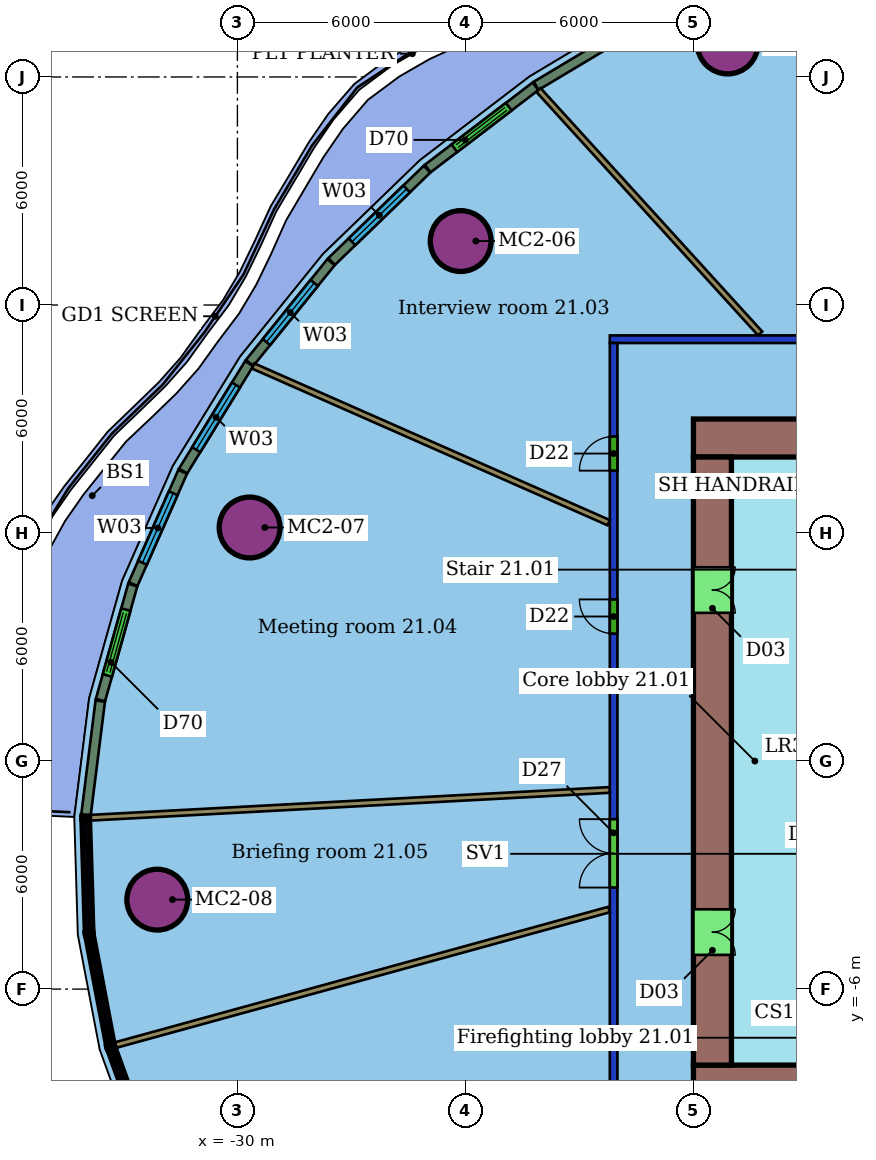
"""IFC4 building model, lengths in metres.
Left out: names, types, materials, properties, quantities, classifications, styles, units other than length and angle.
Written with IfcOpenShell. Run it as: python <this file> out.ifc"""

import sys

from ifc_helpers import new_model, si_unit, direction, frame, frame_2d, origin, origin_2d, place, context, subcontext, project, spatial, rectangle, hollow_circle, extrude, element, fill, save


model = new_model("IFC4")
c1 = context("Model", 3, precision=1e-05, world=origin(), true_north=direction((0.0, 1.0)))
c2 = subcontext(c1, "Body", "Model", "MODEL_VIEW")
j1 = project(units=[si_unit("LENGTHUNIT", "METRE"), si_unit("PLANEANGLEUNIT", "RADIAN")], contexts=[c1])
p1 = place(None, origin())
s1 = spatial("IfcSite", under=j1, at=p1, CompositionType="ELEMENT")
p2 = place(p1, origin())
s2 = spatial("IfcBuilding", under=s1, at=p2, CompositionType="ELEMENT")
p3 = place(p2, frame((0.0, 0.0, 95.8)))
s3 = spatial("IfcBuildingStorey", under=s2, at=p3, CompositionType="ELEMENT", Elevation=95.8)
for number, where, z_axis, x_axis in (
    (1, (-17.1, 18.881, 0.0), (0.0, 0.0, 1.0), (1.0, 0.0, 0.0)),
    (2, (-24.125, 13.683, 0.0), (0.0, 0.0, 1.0), (1.0, 0.0, 0.0)),
    (3, (-29.679, 6.146, 0.0), (0.0, 0.0, 1.0), (1.0, 0.0, 0.0)),
    (4, (-32.109, -3.646, 0.0), (0.0, 0.0, 1.0), (1.0, 0.0, 0.0)),
):
    element("IfcColumn", number, at=place(p3, frame(where, z_axis=z_axis, x_axis=x_axis)), inside=s3, PredefinedType="COLUMN", context=c2, shape_type="SweptSolid", body=[
        extrude(hollow_circle(Radius=0.8, WallThickness=0.055, at=origin_2d()), origin(), (0.0, 0.0, 1.0), 3.45),
    ])
p4 = place(p3, frame((-20.1, -11.0, 0.0), z_axis=(0.0, 0.0, 1.0), x_axis=(0.0, 1.0, 0.0)))
e5 = element("IfcWall", 5, at=p4, inside=s3, PredefinedType="PARTITIONING", context=c2, shape_type="SweptSolid", body=[
    extrude(rectangle(XDim=22.0, YDim=0.2, at=frame_2d((11.0, 0.0))), origin(), (0.0, 0.0, 1.0), 3.0),
])
p5 = place(p4, frame((18.641, 0.0, 0.0)))
e6 = element("IfcOpeningElement", 6, at=p5, cuts=e5, PredefinedType="OPENING", context=c2, shape_type="SweptSolid", body=[
    extrude(rectangle(XDim=0.9, YDim=2.1, at=frame_2d((0.45, 1.05))), frame((0.0, 0.11, 0.0), z_axis=(0.0, -1.0, 0.0), x_axis=(1.0, 0.0, 0.0)), (0.0, 0.0, 1.0), 0.22),
])
p6 = place(p4, frame((14.354, 0.0, 0.0)))
e7 = element("IfcOpeningElement", 7, at=p6, cuts=e5, PredefinedType="OPENING", context=c2, shape_type="SweptSolid", body=[
    extrude(rectangle(XDim=0.9, YDim=2.1, at=frame_2d((0.45, 1.05))), frame((0.0, 0.11, 0.0), z_axis=(0.0, -1.0, 0.0), x_axis=(1.0, 0.0, 0.0)), (0.0, 0.0, 1.0), 0.22),
])
p7 = place(p4, frame((7.672, 0.0, 0.0)))
e8 = element("IfcOpeningElement", 8, at=p7, cuts=e5, PredefinedType="OPENING", context=c2, shape_type="SweptSolid", body=[
    extrude(rectangle(XDim=1.8, YDim=2.4, at=frame_2d((0.9, 1.2))), frame((0.0, 0.11, 0.0), z_axis=(0.0, -1.0, 0.0), x_axis=(1.0, 0.0, 0.0)), (0.0, 0.0, 1.0), 0.22),
])
p8 = place(p3, frame((-20.2, 11.1, 0.0), z_axis=(0.0, 0.0, 1.0), x_axis=(1.0, 0.0, 0.0)))
e9 = element("IfcWall", 9, at=p8, inside=s3, PredefinedType="PARTITIONING", context=c2, shape_type="SweptSolid", body=[
    extrude(rectangle(XDim=28.4, YDim=0.2, at=frame_2d((14.2, 0.0))), origin(), (0.0, 0.0, 1.0), 3.0),
])
p9 = place(p8, frame((20.93, 0.0, 0.0)))
e10 = element("IfcOpeningElement", 10, at=p9, cuts=e9, PredefinedType="OPENING", context=c2, shape_type="SweptSolid", body=[
    extrude(rectangle(XDim=1.8, YDim=2.1, at=frame_2d((0.9, 1.05))), frame((0.0, 0.11, 0.0), z_axis=(0.0, -1.0, 0.0), x_axis=(1.0, 0.0, 0.0)), (0.0, 0.0, 1.0), 0.22),
])
p10 = place(p8, frame((12.561, 0.0, 0.0)))
e11 = element("IfcOpeningElement", 11, at=p10, cuts=e9, PredefinedType="OPENING", context=c2, shape_type="SweptSolid", body=[
    extrude(rectangle(XDim=1.8, YDim=2.1, at=frame_2d((0.9, 1.05))), frame((0.0, 0.11, 0.0), z_axis=(0.0, -1.0, 0.0), x_axis=(1.0, 0.0, 0.0)), (0.0, 0.0, 1.0), 0.22),
])
p11 = place(p3, frame((-22.078, 17.658, 0.0), z_axis=(0.0, 0.0, 1.0), x_axis=(0.673255961177, -0.739409501386, 0.0)))
e12 = element("IfcWall", 12, at=p11, inside=s3, PredefinedType="PARTITIONING", context=c2, shape_type="SweptSolid", body=[
    extrude(rectangle(XDim=8.665, YDim=0.15, at=frame_2d((4.333, 0.0))), origin(), (0.0, 0.0, 1.0), 3.45),
])
p12 = place(p3, frame((-29.583, 10.395, 0.0), z_axis=(0.0, 0.0, 1.0), x_axis=(0.915049283518, -0.403342049301, 0.0)))
e13 = element("IfcWall", 13, at=p12, inside=s3, PredefinedType="PARTITIONING", context=c2, shape_type="SweptSolid", body=[
    extrude(rectangle(XDim=10.222, YDim=0.15, at=frame_2d((5.111, 0.0))), origin(), (0.0, 0.0, 1.0), 3.45),
])
p13 = place(p3, frame((-33.868, -1.491, 0.0), z_axis=(0.0, 0.0, 1.0), x_axis=(0.998571262097, 0.053436265902, 0.0)))
e14 = element("IfcWall", 14, at=p13, inside=s3, PredefinedType="PARTITIONING", context=c2, shape_type="SweptSolid", body=[
    extrude(rectangle(XDim=13.684, YDim=0.15, at=frame_2d((6.842, 0.0))), origin(), (0.0, 0.0, 1.0), 3.45),
])
p14 = place(p3, frame((-33.215, -7.476, 0.0), z_axis=(0.0, 0.0, 1.0), x_axis=(0.9642755307, 0.26490130406, 0.0)))
e15 = element("IfcWall", 15, at=p14, inside=s3, PredefinedType="PARTITIONING", context=c2, shape_type="SweptSolid", body=[
    extrude(rectangle(XDim=13.476, YDim=0.15, at=frame_2d((6.738, 0.0))), origin(), (0.0, 0.0, 1.0), 3.45),
])
p15 = place(p3, frame((-19.063, 19.608, 0.0), z_axis=(0.0, 0.0, 1.0), x_axis=(-0.858051412051, -0.51356379767, 0.0)))
e16 = element("IfcWall", 16, at=p15, inside=s3, PredefinedType="SOLIDWALL", context=c2, shape_type="SweptSolid", body=[
    extrude(rectangle(XDim=3.584, YDim=0.25, at=frame_2d((1.792, 0.0))), origin(), (0.0, 0.0, 1.0), 3.05),
])
p16 = place(p3, frame((-22.157, 17.755, 0.0), z_axis=(0.0, 0.0, 1.0), x_axis=(-0.794806214146, -0.606863314063, 0.0)))
e17 = element("IfcWall", 17, at=p16, inside=s3, PredefinedType="SOLIDWALL", context=c2, shape_type="SweptSolid", body=[
    extrude(rectangle(XDim=3.568, YDim=0.25, at=frame_2d((1.784, 0.0))), origin(), (0.0, 0.0, 1.0), 3.05),
])
p17 = place(p16, frame((0.884, 0.0, 0.0)))
e18 = element("IfcOpeningElement", 18, at=p17, cuts=e17, PredefinedType="OPENING", context=c2, shape_type="SweptSolid", body=[
    extrude(rectangle(XDim=1.8, YDim=2.4, at=frame_2d((0.9, 1.2))), frame((0.0, 0.135, 0.0), z_axis=(0.0, -1.0, 0.0), x_axis=(1.0, 0.0, 0.0)), (0.0, 0.0, 1.0), 0.27),
])
p18 = place(p3, frame((-25.01, 15.574, 0.0), z_axis=(0.0, 0.0, 1.0), x_axis=(-0.718578482656, -0.695445874432, 0.0)))
e19 = element("IfcWall", 19, at=p18, inside=s3, PredefinedType="SOLIDWALL", context=c2, shape_type="SweptSolid", body=[
    extrude(rectangle(XDim=3.493, YDim=0.25, at=frame_2d((1.747, 0.0))), origin(), (0.0, 0.0, 1.0), 3.05),
])
p19 = place(p18, frame((0.747, 0.0, 0.9)))
e20 = element("IfcOpeningElement", 20, at=p19, cuts=e19, PredefinedType="OPENING", context=c2, shape_type="SweptSolid", body=[
    extrude(rectangle(XDim=2.0, YDim=2.1, at=frame_2d((1.0, 1.05))), frame((0.0, 0.135, 0.0), z_axis=(0.0, -1.0, 0.0), x_axis=(1.0, 0.0, 0.0)), (0.0, 0.0, 1.0), 0.27),
])
p20 = place(p3, frame((-27.536, 13.128, 0.0), z_axis=(0.0, 0.0, 1.0), x_axis=(-0.62851383429, -0.777798405826, 0.0)))
e21 = element("IfcWall", 21, at=p20, inside=s3, PredefinedType="SOLIDWALL", context=c2, shape_type="SweptSolid", body=[
    extrude(rectangle(XDim=3.408, YDim=0.25, at=frame_2d((1.704, 0.0))), origin(), (0.0, 0.0, 1.0), 3.05),
])
p21 = place(p20, frame((0.704, 0.0, 0.9)))
e22 = element("IfcOpeningElement", 22, at=p21, cuts=e21, PredefinedType="OPENING", context=c2, shape_type="SweptSolid", body=[
    extrude(rectangle(XDim=2.0, YDim=2.1, at=frame_2d((1.0, 1.05))), frame((0.0, 0.135, 0.0), z_axis=(0.0, -1.0, 0.0), x_axis=(1.0, 0.0, 0.0)), (0.0, 0.0, 1.0), 0.27),
])
p22 = place(p3, frame((-29.692, 10.457, 0.0), z_axis=(0.0, 0.0, 1.0), x_axis=(-0.523740167925, -0.851878064339, 0.0)))
e23 = element("IfcWall", 23, at=p22, inside=s3, PredefinedType="SOLIDWALL", context=c2, shape_type="SweptSolid", body=[
    extrude(rectangle(XDim=3.318, YDim=0.25, at=frame_2d((1.659, 0.0))), origin(), (0.0, 0.0, 1.0), 3.05),
])
p23 = place(p22, frame((0.659, 0.0, 0.9)))
e24 = element("IfcOpeningElement", 24, at=p23, cuts=e23, PredefinedType="OPENING", context=c2, shape_type="SweptSolid", body=[
    extrude(rectangle(XDim=2.0, YDim=2.1, at=frame_2d((1.0, 1.05))), frame((0.0, 0.135, 0.0), z_axis=(0.0, -1.0, 0.0), x_axis=(1.0, 0.0, 0.0)), (0.0, 0.0, 1.0), 0.27),
])
p24 = place(p3, frame((-31.441, 7.609, 0.0), z_axis=(0.0, 0.0, 1.0), x_axis=(-0.404074069782, -0.914726268416, 0.0)))
e25 = element("IfcWall", 25, at=p24, inside=s3, PredefinedType="SOLIDWALL", context=c2, shape_type="SweptSolid", body=[
    extrude(rectangle(XDim=3.228, YDim=0.25, at=frame_2d((1.614, 0.0))), origin(), (0.0, 0.0, 1.0), 3.05),
])
p25 = place(p24, frame((0.614, 0.0, 0.9)))
e26 = element("IfcOpeningElement", 26, at=p25, cuts=e25, PredefinedType="OPENING", context=c2, shape_type="SweptSolid", body=[
    extrude(rectangle(XDim=2.0, YDim=2.1, at=frame_2d((1.0, 1.05))), frame((0.0, 0.135, 0.0), z_axis=(0.0, -1.0, 0.0), x_axis=(1.0, 0.0, 0.0)), (0.0, 0.0, 1.0), 0.27),
])
p26 = place(p3, frame((-32.754, 4.633, 0.0), z_axis=(0.0, 0.0, 1.0), x_axis=(-0.27027785562, -0.962782364173, 0.0)))
e27 = element("IfcWall", 27, at=p26, inside=s3, PredefinedType="SOLIDWALL", context=c2, shape_type="SweptSolid", body=[
    extrude(rectangle(XDim=3.144, YDim=0.25, at=frame_2d((1.572, 0.0))), origin(), (0.0, 0.0, 1.0), 3.05),
])
p27 = place(p26, frame((0.672, 0.0, 0.0)))
e28 = element("IfcOpeningElement", 28, at=p27, cuts=e27, PredefinedType="OPENING", context=c2, shape_type="SweptSolid", body=[
    extrude(rectangle(XDim=1.8, YDim=2.4, at=frame_2d((0.9, 1.2))), frame((0.0, 0.135, 0.0), z_axis=(0.0, -1.0, 0.0), x_axis=(1.0, 0.0, 0.0)), (0.0, 0.0, 1.0), 0.27),
])
p28 = place(p3, frame((-33.609, 1.579, 0.0), z_axis=(0.0, 0.0, 1.0), x_axis=(-0.124351721446, -0.992238201932, 0.0)))
e29 = element("IfcWall", 29, at=p28, inside=s3, PredefinedType="SOLIDWALL", context=c2, shape_type="SweptSolid", body=[
    extrude(rectangle(XDim=3.033, YDim=0.25, at=frame_2d((1.517, 0.0))), origin(), (0.0, 0.0, 1.0), 3.05),
])
p29 = place(p3, frame((-6.0, 8.5, 0.0), z_axis=(0.0, 0.0, 1.0), x_axis=(-1.0, 0.0, 0.0)))
e30 = element("IfcWall", 30, at=p29, inside=s3, PredefinedType="SHEAR", context=c2, shape_type="SweptSolid", body=[
    extrude(rectangle(XDim=12.0, YDim=1.0, at=frame_2d((6.0, 0.0))), origin(), (0.0, 0.0, 1.0), 3.3),
])
p30 = place(p29, frame((5.2, 0.0, 0.0)))
e31 = element("IfcOpeningElement", 31, at=p30, cuts=e30, PredefinedType="OPENING", context=c2, shape_type="SweptSolid", body=[
    extrude(rectangle(XDim=1.2, YDim=2.1, at=frame_2d((0.6, 1.05))), frame((0.0, 0.51, 0.0), z_axis=(0.0, -1.0, 0.0), x_axis=(1.0, 0.0, 0.0)), (0.0, 0.0, 1.0), 1.02),
])
p31 = place(p3, frame((-18.0, -8.5, 0.0), z_axis=(0.0, 0.0, 1.0), x_axis=(1.0, 0.0, 0.0)))
e32 = element("IfcWall", 32, at=p31, inside=s3, PredefinedType="SHEAR", context=c2, shape_type="SweptSolid", body=[
    extrude(rectangle(XDim=24.0, YDim=1.0, at=frame_2d((12.0, 0.0))), origin(), (0.0, 0.0, 1.0), 3.3),
])
p32 = place(p31, frame((6.0, 0.0, 0.0)))
e33 = element("IfcOpeningElement", 33, at=p32, cuts=e32, PredefinedType="OPENING", context=c2, shape_type="SweptSolid", body=[
    extrude(rectangle(XDim=1.2, YDim=2.1, at=frame_2d((0.6, 1.05))), frame((0.0, 0.51, 0.0), z_axis=(0.0, -1.0, 0.0), x_axis=(1.0, 0.0, 0.0)), (0.0, 0.0, 1.0), 1.02),
])
p33 = place(p3, frame((-17.5, 8.0, 0.0), z_axis=(0.0, 0.0, 1.0), x_axis=(0.0, -1.0, 0.0)))
e34 = element("IfcWall", 34, at=p33, inside=s3, PredefinedType="SHEAR", context=c2, shape_type="SweptSolid", body=[
    extrude(rectangle(XDim=16.0, YDim=1.0, at=frame_2d((8.0, 0.0))), origin(), (0.0, 0.0, 1.0), 3.3),
])
p34 = place(p33, frame((11.9, 0.0, 0.0)))
e35 = element("IfcOpeningElement", 35, at=p34, cuts=e34, PredefinedType="OPENING", context=c2, shape_type="SweptSolid", body=[
    extrude(rectangle(XDim=1.2, YDim=2.1, at=frame_2d((0.6, 1.05))), frame((0.0, 0.51, 0.0), z_axis=(0.0, -1.0, 0.0), x_axis=(1.0, 0.0, 0.0)), (0.0, 0.0, 1.0), 1.02),
])
p35 = place(p33, frame((2.9, 0.0, 0.0)))
e36 = element("IfcOpeningElement", 36, at=p35, cuts=e34, PredefinedType="OPENING", context=c2, shape_type="SweptSolid", body=[
    extrude(rectangle(XDim=1.2, YDim=2.1, at=frame_2d((0.6, 1.05))), frame((0.0, 0.51, 0.0), z_axis=(0.0, -1.0, 0.0), x_axis=(1.0, 0.0, 0.0)), (0.0, 0.0, 1.0), 1.02),
])
p36 = place(p5, origin())
e37 = element("IfcDoor", 37, at=p36, inside=s3, OperationType="SINGLE_SWING_LEFT", PredefinedType="DOOR", context=c2, shape_type="SweptSolid", body=[
    extrude(rectangle(XDim=0.9, YDim=2.1, at=frame_2d((0.45, 1.05))), frame((0.0, 0.025, 0.0), z_axis=(0.0, -1.0, 0.0), x_axis=(1.0, 0.0, 0.0)), (0.0, 0.0, 1.0), 0.05),
])
fill(e6, e37)
p37 = place(p6, origin())
e38 = element("IfcDoor", 38, at=p37, inside=s3, OperationType="SINGLE_SWING_RIGHT", PredefinedType="DOOR", context=c2, shape_type="SweptSolid", body=[
    extrude(rectangle(XDim=0.9, YDim=2.1, at=frame_2d((0.45, 1.05))), frame((0.0, 0.025, 0.0), z_axis=(0.0, -1.0, 0.0), x_axis=(1.0, 0.0, 0.0)), (0.0, 0.0, 1.0), 0.05),
])
fill(e7, e38)
p38 = place(p7, origin())
e39 = element("IfcDoor", 39, at=p38, inside=s3, OperationType="DOUBLE_DOOR_SINGLE_SWING", PredefinedType="DOOR", context=c2, shape_type="SweptSolid", body=[
    extrude(rectangle(XDim=1.8, YDim=2.4, at=frame_2d((0.9, 1.2))), frame((0.0, 0.025, 0.0), z_axis=(0.0, -1.0, 0.0), x_axis=(1.0, 0.0, 0.0)), (0.0, 0.0, 1.0), 0.05),
])
fill(e8, e39)
p39 = place(p17, origin())
e40 = element("IfcDoor", 40, at=p39, inside=s3, OperationType="DOUBLE_DOOR_SLIDING", PredefinedType="DOOR", context=c2, shape_type="SweptSolid", body=[
    extrude(rectangle(XDim=1.8, YDim=2.4, at=frame_2d((0.9, 1.2))), frame((0.0, 0.025, 0.0), z_axis=(0.0, -1.0, 0.0), x_axis=(1.0, 0.0, 0.0)), (0.0, 0.0, 1.0), 0.05),
])
fill(e18, e40)
p40 = place(p19, origin())
e41 = element("IfcWindow", 41, at=p40, inside=s3, PartitioningType="SINGLE_PANEL", PredefinedType="WINDOW", context=c2, shape_type="SweptSolid", body=[
    extrude(rectangle(XDim=2.0, YDim=2.1, at=frame_2d((1.0, 1.05))), frame((0.0, 0.03, 0.0), z_axis=(0.0, -1.0, 0.0), x_axis=(1.0, 0.0, 0.0)), (0.0, 0.0, 1.0), 0.06),
])
fill(e20, e41)
p41 = place(p21, origin())
e42 = element("IfcWindow", 42, at=p41, inside=s3, PartitioningType="SINGLE_PANEL", PredefinedType="WINDOW", context=c2, shape_type="SweptSolid", body=[
    extrude(rectangle(XDim=2.0, YDim=2.1, at=frame_2d((1.0, 1.05))), frame((0.0, 0.03, 0.0), z_axis=(0.0, -1.0, 0.0), x_axis=(1.0, 0.0, 0.0)), (0.0, 0.0, 1.0), 0.06),
])
fill(e22, e42)
p42 = place(p23, origin())
e43 = element("IfcWindow", 43, at=p42, inside=s3, PartitioningType="SINGLE_PANEL", PredefinedType="WINDOW", context=c2, shape_type="SweptSolid", body=[
    extrude(rectangle(XDim=2.0, YDim=2.1, at=frame_2d((1.0, 1.05))), frame((0.0, 0.03, 0.0), z_axis=(0.0, -1.0, 0.0), x_axis=(1.0, 0.0, 0.0)), (0.0, 0.0, 1.0), 0.06),
])
fill(e24, e43)
p43 = place(p25, origin())
e44 = element("IfcWindow", 44, at=p43, inside=s3, PartitioningType="SINGLE_PANEL", PredefinedType="WINDOW", context=c2, shape_type="SweptSolid", body=[
    extrude(rectangle(XDim=2.0, YDim=2.1, at=frame_2d((1.0, 1.05))), frame((0.0, 0.03, 0.0), z_axis=(0.0, -1.0, 0.0), x_axis=(1.0, 0.0, 0.0)), (0.0, 0.0, 1.0), 0.06),
])
fill(e26, e44)
p44 = place(p27, origin())
e45 = element("IfcDoor", 45, at=p44, inside=s3, OperationType="DOUBLE_DOOR_SLIDING", PredefinedType="DOOR", context=c2, shape_type="SweptSolid", body=[
    extrude(rectangle(XDim=1.8, YDim=2.4, at=frame_2d((0.9, 1.2))), frame((0.0, 0.025, 0.0), z_axis=(0.0, -1.0, 0.0), x_axis=(1.0, 0.0, 0.0)), (0.0, 0.0, 1.0), 0.05),
])
fill(e28, e45)
p45 = place(p34, origin())
e46 = element("IfcDoor", 46, at=p45, inside=s3, OperationType="DOUBLE_DOOR_SINGLE_SWING", PredefinedType="NOTDEFINED", context=c2, shape_type="SweptSolid", body=[
    extrude(rectangle(XDim=1.2, YDim=2.1, at=frame_2d((0.6, 1.05))), frame((0.0, 0.025, 0.0), z_axis=(0.0, -1.0, 0.0), x_axis=(1.0, 0.0, 0.0)), (0.0, 0.0, 1.0), 0.05),
])
fill(e35, e46)
p46 = place(p35, origin())
e47 = element("IfcDoor", 47, at=p46, inside=s3, OperationType="DOUBLE_DOOR_SINGLE_SWING", PredefinedType="NOTDEFINED", context=c2, shape_type="SweptSolid", body=[
    extrude(rectangle(XDim=1.2, YDim=2.1, at=frame_2d((0.6, 1.05))), frame((0.0, 0.025, 0.0), z_axis=(0.0, -1.0, 0.0), x_axis=(1.0, 0.0, 0.0)), (0.0, 0.0, 1.0), 0.05),
])
fill(e36, e47)
save(model, sys.argv[1])
